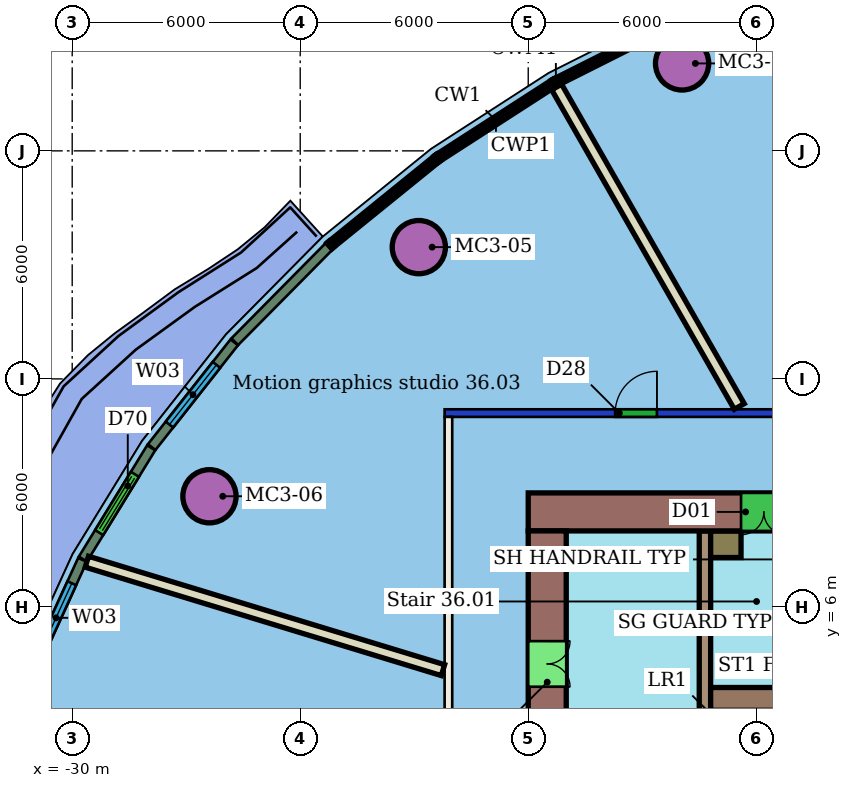
"""IFC4 building model, lengths in metres.
Left out: names, types, materials, properties, quantities, classifications, styles, units other than length and angle.
Written with IfcOpenShell. Run it as: python <this file> out.ifc"""

import sys

from ifc_helpers import new_model, si_unit, direction, frame, frame_2d, origin, origin_2d, place, context, subcontext, project, spatial, rectangle, hollow_circle, extrude, element, fill, save


model = new_model("IFC4")
c1 = context("Model", 3, precision=1e-05, world=origin(), true_north=direction((0.0, 1.0)))
c2 = subcontext(c1, "Body", "Model", "MODEL_VIEW")
j1 = project(units=[si_unit("LENGTHUNIT", "METRE"), si_unit("PLANEANGLEUNIT", "RADIAN")], contexts=[c1])
p1 = place(None, origin())
s1 = spatial("IfcSite", under=j1, at=p1, CompositionType="ELEMENT")
p2 = place(p1, origin())
s2 = spatial("IfcBuilding", under=s1, at=p2, CompositionType="ELEMENT")
p3 = place(p2, frame((0.0, 0.0, 154.2)))
s3 = spatial("IfcBuildingStorey", under=s2, at=p3, CompositionType="ELEMENT", Elevation=154.2)
for number, where, z_axis, x_axis in (
    (1, (-13.952, 20.301, 0.0), (0.0, 0.0, 1.0), (1.0, 0.0, 0.0)),
    (2, (-20.879, 15.467, 0.0), (0.0, 0.0, 1.0), (1.0, 0.0, 0.0)),
    (3, (-26.388, 8.912, 0.0), (0.0, 0.0, 1.0), (1.0, 0.0, 0.0)),
):
    element("IfcColumn", number, at=place(p3, frame(where, z_axis=z_axis, x_axis=x_axis)), inside=s3, PredefinedType="COLUMN", context=c2, shape_type="SweptSolid", body=[
        extrude(hollow_circle(Radius=0.7, WallThickness=0.05, at=origin_2d()), origin(), (0.0, 0.0, 1.0), 3.45),
    ])
p4 = place(p3, frame((-20.1, -11.0, 0.0), z_axis=(0.0, 0.0, 1.0), x_axis=(0.0, 1.0, 0.0)))
e4 = element("IfcWall", 4, at=p4, inside=s3, PredefinedType="PARTITIONING", context=c2, shape_type="SweptSolid", body=[
    extrude(rectangle(XDim=22.0, YDim=0.2, at=frame_2d((11.0, 0.0))), origin(), (0.0, 0.0, 1.0), 3.45),
])
p5 = place(p4, frame((8.83, 0.0, 0.0)))
e5 = element("IfcOpeningElement", 5, at=p5, cuts=e4, PredefinedType="OPENING", context=c2, shape_type="SweptSolid", body=[
    extrude(rectangle(XDim=1.8, YDim=2.1, at=frame_2d((0.9, 1.05))), frame((0.0, 0.11, 0.0), z_axis=(0.0, -1.0, 0.0), x_axis=(1.0, 0.0, 0.0)), (0.0, 0.0, 1.0), 0.22),
])
p6 = place(p4, frame((3.613, 0.0, 0.0)))
e6 = element("IfcOpeningElement", 6, at=p6, cuts=e4, PredefinedType="OPENING", context=c2, shape_type="SweptSolid", body=[
    extrude(rectangle(XDim=1.0, YDim=2.1, at=frame_2d((0.5, 1.05))), frame((0.0, 0.11, 0.0), z_axis=(0.0, -1.0, 0.0), x_axis=(1.0, 0.0, 0.0)), (0.0, 0.0, 1.0), 0.22),
])
p7 = place(p3, frame((-20.2, 11.1, 0.0), z_axis=(0.0, 0.0, 1.0), x_axis=(1.0, 0.0, 0.0)))
e7 = element("IfcWall", 7, at=p7, inside=s3, PredefinedType="PARTITIONING", context=c2, shape_type="SweptSolid", body=[
    extrude(rectangle(XDim=28.4, YDim=0.2, at=frame_2d((14.2, 0.0))), origin(), (0.0, 0.0, 1.0), 3.05),
])
p8 = place(p7, frame((21.299, 0.0, 0.0)))
e8 = element("IfcOpeningElement", 8, at=p8, cuts=e7, PredefinedType="OPENING", context=c2, shape_type="SweptSolid", body=[
    extrude(rectangle(XDim=0.9, YDim=2.1, at=frame_2d((0.45, 1.05))), frame((0.0, 0.11, 0.0), z_axis=(0.0, -1.0, 0.0), x_axis=(1.0, 0.0, 0.0)), (0.0, 0.0, 1.0), 0.22),
])
p9 = place(p7, frame((15.033, 0.0, 0.0)))
e9 = element("IfcOpeningElement", 9, at=p9, cuts=e7, PredefinedType="OPENING", context=c2, shape_type="SweptSolid", body=[
    extrude(rectangle(XDim=1.8, YDim=2.1, at=frame_2d((0.9, 1.05))), frame((0.0, 0.11, 0.0), z_axis=(0.0, -1.0, 0.0), x_axis=(1.0, 0.0, 0.0)), (0.0, 0.0, 1.0), 0.22),
])
p10 = place(p7, frame((4.487, 0.0, 0.0)))
e10 = element("IfcOpeningElement", 10, at=p10, cuts=e7, PredefinedType="OPENING", context=c2, shape_type="SweptSolid", body=[
    extrude(rectangle(XDim=1.1, YDim=2.1, at=frame_2d((0.55, 1.05))), frame((0.0, 0.11, 0.0), z_axis=(0.0, -1.0, 0.0), x_axis=(1.0, 0.0, 0.0)), (0.0, 0.0, 1.0), 0.22),
])
p11 = place(p3, frame((-17.253, 19.68, 0.0), z_axis=(0.0, 0.0, 1.0), x_axis=(0.496369717396, -0.868111227696, 0.0)))
e11 = element("IfcWall", 11, at=p11, inside=s3, PredefinedType="PARTITIONING", context=c2, shape_type="SweptSolid", body=[
    extrude(rectangle(XDim=9.683, YDim=0.3, at=frame_2d((4.842, 0.0))), origin(), (0.0, 0.0, 1.0), 3.45),
])
p12 = place(p3, frame((-29.615, 7.19, 0.0), z_axis=(0.0, 0.0, 1.0), x_axis=(0.956644596767, -0.291257816164, 0.0)))
e12 = element("IfcWall", 12, at=p12, inside=s3, PredefinedType="PARTITIONING", context=c2, shape_type="SweptSolid", body=[
    extrude(rectangle(XDim=9.796, YDim=0.3, at=frame_2d((4.898, 0.0))), origin(), (0.0, 0.0, 1.0), 3.45),
])
p13 = place(p3, frame((-23.243, 15.484, 0.0), z_axis=(0.0, 0.0, 1.0), x_axis=(-0.703320991983, -0.710872409253, 0.0)))
e13 = element("IfcWall", 13, at=p13, inside=s3, PredefinedType="SOLIDWALL", context=c2, shape_type="SweptSolid", body=[
    extrude(rectangle(XDim=3.524, YDim=0.25, at=frame_2d((1.762, 0.0))), origin(), (0.0, 0.0, 1.0), 3.1),
])
p14 = place(p3, frame((-25.736, 12.962, 0.0), z_axis=(0.0, 0.0, 1.0), x_axis=(-0.618917748118, -0.785455804654, 0.0)))
e14 = element("IfcWall", 14, at=p14, inside=s3, PredefinedType="SOLIDWALL", context=c2, shape_type="SweptSolid", body=[
    extrude(rectangle(XDim=3.51, YDim=0.25, at=frame_2d((1.755, 0.0))), origin(), (0.0, 0.0, 1.0), 3.1),
])
p15 = place(p14, frame((0.755, 0.0, 0.9)))
e15 = element("IfcOpeningElement", 15, at=p15, cuts=e14, PredefinedType="OPENING", context=c2, shape_type="SweptSolid", body=[
    extrude(rectangle(XDim=2.0, YDim=2.1, at=frame_2d((1.0, 1.05))), frame((0.0, 0.135, 0.0), z_axis=(0.0, -1.0, 0.0), x_axis=(1.0, 0.0, 0.0)), (0.0, 0.0, 1.0), 0.27),
])
p16 = place(p3, frame((-27.921, 10.187, 0.0), z_axis=(0.0, 0.0, 1.0), x_axis=(-0.52303850946, -0.852309050534, 0.0)))
e16 = element("IfcWall", 16, at=p16, inside=s3, PredefinedType="SOLIDWALL", context=c2, shape_type="SweptSolid", body=[
    extrude(rectangle(XDim=3.436, YDim=0.25, at=frame_2d((1.718, 0.0))), origin(), (0.0, 0.0, 1.0), 3.1),
])
p17 = place(p16, frame((0.818, 0.0, 0.0)))
e17 = element("IfcOpeningElement", 17, at=p17, cuts=e16, PredefinedType="OPENING", context=c2, shape_type="SweptSolid", body=[
    extrude(rectangle(XDim=1.8, YDim=2.4, at=frame_2d((0.9, 1.2))), frame((0.0, 0.135, 0.0), z_axis=(0.0, -1.0, 0.0), x_axis=(1.0, 0.0, 0.0)), (0.0, 0.0, 1.0), 0.27),
])
p18 = place(p3, frame((-29.729, 7.238, 0.0), z_axis=(0.0, 0.0, 1.0), x_axis=(-0.415294970102, -0.909686807537, 0.0)))
e18 = element("IfcWall", 18, at=p18, inside=s3, PredefinedType="SOLIDWALL", context=c2, shape_type="SweptSolid", body=[
    extrude(rectangle(XDim=3.352, YDim=0.25, at=frame_2d((1.676, 0.0))), origin(), (0.0, 0.0, 1.0), 3.1),
])
p19 = place(p18, frame((0.676, 0.0, 0.9)))
e19 = element("IfcOpeningElement", 19, at=p19, cuts=e18, PredefinedType="OPENING", context=c2, shape_type="SweptSolid", body=[
    extrude(rectangle(XDim=2.0, YDim=2.1, at=frame_2d((1.0, 1.05))), frame((0.0, 0.135, 0.0), z_axis=(0.0, -1.0, 0.0), x_axis=(1.0, 0.0, 0.0)), (0.0, 0.0, 1.0), 0.27),
])
p20 = place(p3, frame((-6.0, 8.5, 0.0), z_axis=(0.0, 0.0, 1.0), x_axis=(-1.0, 0.0, 0.0)))
e20 = element("IfcWall", 20, at=p20, inside=s3, PredefinedType="SHEAR", context=c2, shape_type="SweptSolid", body=[
    extrude(rectangle(XDim=12.0, YDim=1.0, at=frame_2d((6.0, 0.0))), origin(), (0.0, 0.0, 1.0), 3.3),
])
p21 = place(p20, frame((5.2, 0.0, 0.0)))
e21 = element("IfcOpeningElement", 21, at=p21, cuts=e20, PredefinedType="OPENING", context=c2, shape_type="SweptSolid", body=[
    extrude(rectangle(XDim=1.2, YDim=2.1, at=frame_2d((0.6, 1.05))), frame((0.0, 0.51, 0.0), z_axis=(0.0, -1.0, 0.0), x_axis=(1.0, 0.0, 0.0)), (0.0, 0.0, 1.0), 1.02),
])
p22 = place(p3, frame((-17.5, 8.0, 0.0), z_axis=(0.0, 0.0, 1.0), x_axis=(0.0, -1.0, 0.0)))
e22 = element("IfcWall", 22, at=p22, inside=s3, PredefinedType="SHEAR", context=c2, shape_type="SweptSolid", body=[
    extrude(rectangle(XDim=16.0, YDim=1.0, at=frame_2d((8.0, 0.0))), origin(), (0.0, 0.0, 1.0), 3.3),
])
p23 = place(p22, frame((11.9, 0.0, 0.0)))
e23 = element("IfcOpeningElement", 23, at=p23, cuts=e22, PredefinedType="OPENING", context=c2, shape_type="SweptSolid", body=[
    extrude(rectangle(XDim=1.2, YDim=2.1, at=frame_2d((0.6, 1.05))), frame((0.0, 0.51, 0.0), z_axis=(0.0, -1.0, 0.0), x_axis=(1.0, 0.0, 0.0)), (0.0, 0.0, 1.0), 1.02),
])
p24 = place(p22, frame((2.9, 0.0, 0.0)))
e24 = element("IfcOpeningElement", 24, at=p24, cuts=e22, PredefinedType="OPENING", context=c2, shape_type="SweptSolid", body=[
    extrude(rectangle(XDim=1.2, YDim=2.1, at=frame_2d((0.6, 1.05))), frame((0.0, 0.51, 0.0), z_axis=(0.0, -1.0, 0.0), x_axis=(1.0, 0.0, 0.0)), (0.0, 0.0, 1.0), 1.02),
])
p25 = place(p3, frame((-13.2, 3.58, 0.0), z_axis=(0.0, 0.0, 1.0), x_axis=(1.0, 0.0, 0.0)))
e25 = element("IfcWall", 25, at=p25, inside=s3, PredefinedType="SHEAR", context=c2, shape_type="SweptSolid", body=[
    extrude(rectangle(XDim=7.2, YDim=0.6, at=frame_2d((3.6, 0.0))), origin(), (0.0, 0.0, 1.0), 3.3),
])
p26 = place(p3, frame((-13.35, 8.0, 0.0), z_axis=(0.0, 0.0, 1.0), x_axis=(0.0, -1.0, 0.0)))
e26 = element("IfcWall", 26, at=p26, inside=s3, PredefinedType="SHEAR", context=c2, shape_type="SweptSolid", body=[
    extrude(rectangle(XDim=16.0, YDim=0.3, at=frame_2d((8.0, 0.0))), origin(), (0.0, 0.0, 1.0), 3.3),
])
p27 = place(p26, frame((7.25, 0.0, 0.0)))
e27 = element("IfcOpeningElement", 27, at=p27, cuts=e26, PredefinedType="OPENING", context=c2, shape_type="SweptSolid", body=[
    extrude(rectangle(XDim=1.5, YDim=2.1, at=frame_2d((0.75, 1.05))), frame((0.0, 0.16, 0.0), z_axis=(0.0, -1.0, 0.0), x_axis=(1.0, 0.0, 0.0)), (0.0, 0.0, 1.0), 0.32),
])
p28 = place(p3, frame((-13.2, 7.65, 0.0), z_axis=(0.0, 0.0, 1.0), x_axis=(1.0, 0.0, 0.0)))
e28 = element("IfcWall", 28, at=p28, inside=s3, PredefinedType="SHEAR", context=c2, shape_type="SweptSolid", body=[
    extrude(rectangle(XDim=0.8, YDim=0.7, at=frame_2d((0.4, 0.0))), origin(), (0.0, 0.0, 1.0), 3.3),
])
p29 = place(p10, origin())
e29 = element("IfcDoor", 29, at=p29, inside=s3, OperationType="SINGLE_SWING_RIGHT", PredefinedType="DOOR", context=c2, shape_type="SweptSolid", body=[
    extrude(rectangle(XDim=1.1, YDim=2.1, at=frame_2d((0.55, 1.05))), frame((0.0, 0.025, 0.0), z_axis=(0.0, -1.0, 0.0), x_axis=(1.0, 0.0, 0.0)), (0.0, 0.0, 1.0), 0.05),
])
fill(e10, e29)
p30 = place(p15, origin())
e30 = element("IfcWindow", 30, at=p30, inside=s3, PartitioningType="SINGLE_PANEL", PredefinedType="WINDOW", context=c2, shape_type="SweptSolid", body=[
    extrude(rectangle(XDim=2.0, YDim=2.1, at=frame_2d((1.0, 1.05))), frame((0.0, 0.03, 0.0), z_axis=(0.0, -1.0, 0.0), x_axis=(1.0, 0.0, 0.0)), (0.0, 0.0, 1.0), 0.06),
])
fill(e15, e30)
p31 = place(p17, origin())
e31 = element("IfcDoor", 31, at=p31, inside=s3, OperationType="DOUBLE_DOOR_SLIDING", PredefinedType="DOOR", context=c2, shape_type="SweptSolid", body=[
    extrude(rectangle(XDim=1.8, YDim=2.4, at=frame_2d((0.9, 1.2))), frame((0.0, 0.025, 0.0), z_axis=(0.0, -1.0, 0.0), x_axis=(1.0, 0.0, 0.0)), (0.0, 0.0, 1.0), 0.05),
])
fill(e17, e31)
p32 = place(p19, origin())
e32 = element("IfcWindow", 32, at=p32, inside=s3, PartitioningType="SINGLE_PANEL", PredefinedType="WINDOW", context=c2, shape_type="SweptSolid", body=[
    extrude(rectangle(XDim=2.0, YDim=2.1, at=frame_2d((1.0, 1.05))), frame((0.0, 0.03, 0.0), z_axis=(0.0, -1.0, 0.0), x_axis=(1.0, 0.0, 0.0)), (0.0, 0.0, 1.0), 0.06),
])
fill(e19, e32)
p33 = place(p21, origin())
e33 = element("IfcDoor", 33, at=p33, inside=s3, OperationType="DOUBLE_DOOR_SINGLE_SWING", PredefinedType="NOTDEFINED", context=c2, shape_type="SweptSolid", body=[
    extrude(rectangle(XDim=1.2, YDim=2.1, at=frame_2d((0.6, 1.05))), frame((0.0, 0.025, 0.0), z_axis=(0.0, -1.0, 0.0), x_axis=(1.0, 0.0, 0.0)), (0.0, 0.0, 1.0), 0.05),
])
fill(e21, e33)
p34 = place(p24, origin())
e34 = element("IfcDoor", 34, at=p34, inside=s3, OperationType="DOUBLE_DOOR_SINGLE_SWING", PredefinedType="NOTDEFINED", context=c2, shape_type="SweptSolid", body=[
    extrude(rectangle(XDim=1.2, YDim=2.1, at=frame_2d((0.6, 1.05))), frame((0.0, 0.025, 0.0), z_axis=(0.0, -1.0, 0.0), x_axis=(1.0, 0.0, 0.0)), (0.0, 0.0, 1.0), 0.05),
])
fill(e24, e34)
save(model, sys.argv[1])
